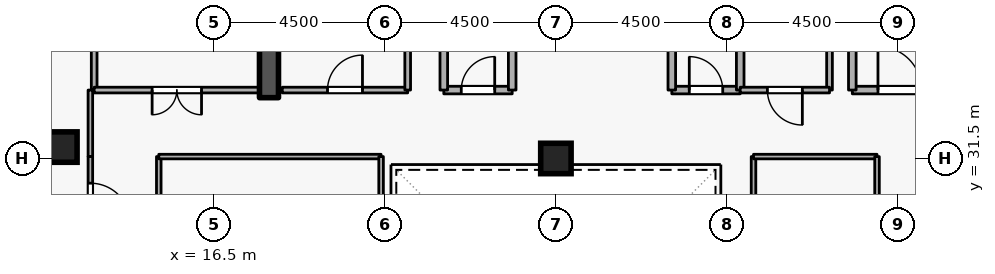
"""IFC4 building model, lengths in metres.
Left out: names, types, materials, properties, quantities, classifications, styles, units other than length and angle.
Written with IfcOpenShell. Run it as: python <this file> out.ifc"""

import sys

from ifc_helpers import new_model, si_unit, direction, frame, frame_2d, origin, origin_2d, place, context, subcontext, project, spatial, rectangle, extrude, element, fill, save


model = new_model("IFC4")
c1 = context("Model", 3, precision=1e-05, world=origin(), true_north=direction((0.0, 1.0)))
c2 = subcontext(c1, "Body", "Model", "MODEL_VIEW")
j1 = project(units=[si_unit("LENGTHUNIT", "METRE"), si_unit("PLANEANGLEUNIT", "RADIAN")], contexts=[c1])
p1 = place(None, origin())
s1 = spatial("IfcSite", under=j1, at=p1, CompositionType="ELEMENT")
p2 = place(p1, origin())
s2 = spatial("IfcBuilding", under=s1, at=p2, CompositionType="ELEMENT")
p3 = place(p2, frame((0.0, 0.0, 261.9)))
s3 = spatial("IfcBuildingStorey", under=s2, at=p3, CompositionType="ELEMENT", Elevation=261.9)
p4 = place(p3, frame((17.95, 33.1, 0.0), z_axis=(0.0, 0.0, 1.0), x_axis=(0.0, 1.0, 0.0)))
e1 = element("IfcWall", 1, at=p4, inside=s3, PredefinedType="SHEAR", context=c2, shape_type="SweptSolid", body=[
    extrude(rectangle(XDim=5.8, YDim=0.5, at=frame_2d((2.9, 0.0))), origin(), (0.0, 0.0, 1.0), 3.6),
])
for number, where, z_axis, x_axis in (
    (2, (12.5, 31.8, 0.0), (0.0, 0.0, 1.0), (1.0, 0.0, 0.0)),
    (3, (25.5, 31.5, 0.0), (0.0, 0.0, 1.0), (1.0, 0.0, 0.0)),
):
    element("IfcColumn", number, at=place(p3, frame(where, z_axis=z_axis, x_axis=x_axis)), inside=s3, PredefinedType="COLUMN", context=c2, shape_type="SweptSolid", body=[
        extrude(rectangle(XDim=0.8, YDim=0.8, at=origin_2d()), origin(), (0.0, 0.0, 1.0), 3.6),
    ])
p5 = place(p3, frame((33.3, 33.3, 0.0), z_axis=(0.0, 0.0, 1.0), x_axis=(1.0, 0.0, 0.0)))
e4 = element("IfcWall", 4, at=p5, inside=s3, PredefinedType="STANDARD", context=c2, shape_type="SweptSolid", body=[
    extrude(rectangle(XDim=2.5, YDim=0.2, at=frame_2d((1.25, 0.0))), origin(), (0.0, 0.0, 1.0), 3.34),
])
p6 = place(p5, frame((0.675, 0.0, 0.0)))
e5 = element("IfcOpeningElement", 5, at=p6, cuts=e4, PredefinedType="OPENING", context=c2, shape_type="SweptSolid", body=[
    extrude(rectangle(XDim=1.15, YDim=2.1, at=frame_2d((0.575, 1.05))), frame((0.0, 0.11, 0.0), z_axis=(0.0, -1.0, 0.0), x_axis=(1.0, 0.0, 0.0)), (0.0, 0.0, 1.0), 0.22),
])
p7 = place(p3, frame((33.3, 35.6, 0.0), z_axis=(0.0, 0.0, 1.0), x_axis=(0.0, -1.0, 0.0)))
e6 = element("IfcWall", 6, at=p7, inside=s3, PredefinedType="STANDARD", context=c2, shape_type="SweptSolid", body=[
    extrude(rectangle(XDim=2.3, YDim=0.2, at=frame_2d((1.15, 0.0))), origin(), (0.0, 0.0, 1.0), 2.545),
])
p8 = place(p3, frame((22.55, 33.3, 0.0), z_axis=(0.0, 0.0, 1.0), x_axis=(1.0, 0.0, 0.0)))
e7 = element("IfcWall", 7, at=p8, inside=s3, PredefinedType="STANDARD", context=c2, shape_type="SweptSolid", body=[
    extrude(rectangle(XDim=1.8, YDim=0.2, at=frame_2d((0.9, 0.0))), origin(), (0.0, 0.0, 1.0), 3.34),
])
p9 = place(p8, frame((0.46, 0.0, 0.0)))
e8 = element("IfcOpeningElement", 8, at=p9, cuts=e7, PredefinedType="OPENING", context=c2, shape_type="SweptSolid", body=[
    extrude(rectangle(XDim=0.88, YDim=2.04, at=frame_2d((0.44, 1.02))), frame((0.0, 0.11, 0.0), z_axis=(0.0, -1.0, 0.0), x_axis=(1.0, 0.0, 0.0)), (0.0, 0.0, 1.0), 0.22),
])
for number, where, z_axis, x_axis in (
    (9, (24.35, 33.3, 0.0), (0.0, 0.0, 1.0), (0.0, 1.0, 0.0)),
    (10, (22.55, 35.35, 0.0), (0.0, 0.0, 1.0), (0.0, -1.0, 0.0)),
):
    element("IfcWall", number, at=place(p3, frame(where, z_axis=z_axis, x_axis=x_axis)), inside=s3, PredefinedType="STANDARD", context=c2, shape_type="SweptSolid", body=[
        extrude(rectangle(XDim=2.05, YDim=0.2, at=frame_2d((1.025, 0.0))), origin(), (0.0, 0.0, 1.0), 3.34),
    ])
p10 = place(p3, frame((28.55, 33.3, 0.0), z_axis=(0.0, 0.0, 1.0), x_axis=(1.0, 0.0, 0.0)))
e11 = element("IfcWall", 11, at=p10, inside=s3, PredefinedType="STANDARD", context=c2, shape_type="SweptSolid", body=[
    extrude(rectangle(XDim=1.8, YDim=0.2, at=frame_2d((0.9, 0.0))), origin(), (0.0, 0.0, 1.0), 3.34),
])
p11 = place(p10, frame((0.46, 0.0, 0.0)))
e12 = element("IfcOpeningElement", 12, at=p11, cuts=e11, PredefinedType="OPENING", context=c2, shape_type="SweptSolid", body=[
    extrude(rectangle(XDim=0.88, YDim=2.04, at=frame_2d((0.44, 1.02))), frame((0.0, 0.11, 0.0), z_axis=(0.0, -1.0, 0.0), x_axis=(1.0, 0.0, 0.0)), (0.0, 0.0, 1.0), 0.22),
])
for number, where, z_axis, x_axis in (
    (13, (30.35, 33.3, 0.0), (0.0, 0.0, 1.0), (0.0, 1.0, 0.0)),
    (14, (28.55, 35.35, 0.0), (0.0, 0.0, 1.0), (0.0, -1.0, 0.0)),
):
    element("IfcWall", number, at=place(p3, frame(where, z_axis=z_axis, x_axis=x_axis)), inside=s3, PredefinedType="STANDARD", context=c2, shape_type="SweptSolid", body=[
        extrude(rectangle(XDim=2.05, YDim=0.2, at=frame_2d((1.025, 0.0))), origin(), (0.0, 0.0, 1.0), 3.34),
    ])
p12 = place(p3, frame((18.3, 33.3, 0.0), z_axis=(0.0, 0.0, 1.0), x_axis=(1.0, 0.0, 0.0)))
e15 = element("IfcWall", 15, at=p12, inside=s3, PredefinedType="PARTITIONING", context=c2, shape_type="SweptSolid", body=[
    extrude(rectangle(XDim=3.3, YDim=0.15, at=frame_2d((1.65, 0.0))), origin(), (0.0, 0.0, 1.0), 3.34),
])
p13 = place(p12, frame((1.19, 0.0, 0.0)))
e16 = element("IfcOpeningElement", 16, at=p13, cuts=e15, PredefinedType="OPENING", context=c2, shape_type="SweptSolid", body=[
    extrude(rectangle(XDim=0.92, YDim=2.08, at=frame_2d((0.46, 1.04))), frame((0.0, 0.085, 0.0), z_axis=(0.0, -1.0, 0.0), x_axis=(1.0, 0.0, 0.0)), (0.0, 0.0, 1.0), 0.17),
])
p14 = place(p3, frame((21.6, 33.3, 0.0), z_axis=(0.0, 0.0, 1.0), x_axis=(0.0, 1.0, 0.0)))
e17 = element("IfcWall", 17, at=p14, inside=s3, PredefinedType="PARTITIONING", context=c2, shape_type="SweptSolid", body=[
    extrude(rectangle(XDim=2.05, YDim=0.15, at=frame_2d((1.025, 0.0))), origin(), (0.0, 0.0, 1.0), 3.34),
])
p15 = place(p3, frame((32.7, 35.35, 0.0), z_axis=(0.0, 0.0, 1.0), x_axis=(0.0, -1.0, 0.0)))
e18 = element("IfcWall", 18, at=p15, inside=s3, PredefinedType="PARTITIONING", context=c2, shape_type="SweptSolid", body=[
    extrude(rectangle(XDim=2.05, YDim=0.15, at=frame_2d((1.025, 0.0))), origin(), (0.0, 0.0, 1.0), 2.545),
])
p16 = place(p3, frame((32.7, 33.3, 0.0), z_axis=(0.0, 0.0, 1.0), x_axis=(-1.0, 0.0, 0.0)))
e19 = element("IfcWall", 19, at=p16, inside=s3, PredefinedType="PARTITIONING", context=c2, shape_type="SweptSolid", body=[
    extrude(rectangle(XDim=2.35, YDim=0.15, at=frame_2d((1.175, 0.0))), origin(), (0.0, 0.0, 1.0), 3.34),
])
p17 = place(p16, frame((0.715, 0.0, 0.0)))
e20 = element("IfcOpeningElement", 20, at=p17, cuts=e19, PredefinedType="OPENING", context=c2, shape_type="SweptSolid", body=[
    extrude(rectangle(XDim=0.92, YDim=2.08, at=frame_2d((0.46, 1.04))), frame((0.0, 0.085, 0.0), z_axis=(0.0, -1.0, 0.0), x_axis=(1.0, 0.0, 0.0)), (0.0, 0.0, 1.0), 0.17),
])
p18 = place(p3, frame((13.35, 33.3, 0.0), z_axis=(0.0, 0.0, 1.0), x_axis=(0.0, 1.0, 0.0)))
e21 = element("IfcWall", 21, at=p18, inside=s3, PredefinedType="PARTITIONING", context=c2, shape_type="SweptSolid", body=[
    extrude(rectangle(XDim=11.42, YDim=0.15, at=frame_2d((5.71, 0.0))), origin(), (0.0, 0.0, 1.0), 3.34),
])
p19 = place(p3, frame((17.7, 33.3, 0.0), z_axis=(0.0, 0.0, 1.0), x_axis=(-1.0, 0.0, 0.0)))
e22 = element("IfcWall", 22, at=p19, inside=s3, PredefinedType="PARTITIONING", context=c2, shape_type="SweptSolid", body=[
    extrude(rectangle(XDim=4.35, YDim=0.15, at=frame_2d((2.175, 0.0))), origin(), (0.0, 0.0, 1.0), 3.34),
])
p20 = place(p19, frame((1.525, 0.0, 0.0)))
e23 = element("IfcOpeningElement", 23, at=p20, cuts=e22, PredefinedType="OPENING", context=c2, shape_type="SweptSolid", body=[
    extrude(rectangle(XDim=1.3, YDim=2.12, at=frame_2d((0.65, 1.06))), frame((0.0, 0.085, 0.0), z_axis=(0.0, -1.0, 0.0), x_axis=(1.0, 0.0, 0.0)), (0.0, 0.0, 1.0), 0.17),
])
p21 = place(p3, frame((13.25, 33.3, 0.0), z_axis=(0.0, 0.0, 1.0), x_axis=(0.0, -1.0, 0.0)))
e24 = element("IfcWall", 24, at=p21, inside=s3, PredefinedType="PARTITIONING", context=c2, shape_type="SweptSolid", body=[
    extrude(rectangle(XDim=1.75, YDim=0.12, at=frame_2d((0.875, 0.0))), origin(), (0.0, 0.0, 1.0), 3.34),
])
p22 = place(p3, frame((13.25, 31.55, 0.0), z_axis=(0.0, 0.0, 1.0), x_axis=(0.0, -1.0, 0.0)))
e25 = element("IfcWall", 25, at=p22, inside=s3, PredefinedType="PARTITIONING", context=c2, shape_type="SweptSolid", body=[
    extrude(rectangle(XDim=2.45, YDim=0.12, at=frame_2d((1.225, 0.0))), origin(), (0.0, 0.0, 1.0), 3.34),
])
p23 = place(p22, frame((0.7, 0.0, 0.0)))
e26 = element("IfcOpeningElement", 26, at=p23, cuts=e25, PredefinedType="OPENING", context=c2, shape_type="SweptSolid", body=[
    extrude(rectangle(XDim=1.05, YDim=2.1, at=frame_2d((0.525, 1.05))), frame((0.0, 0.07, 0.0), z_axis=(0.0, -1.0, 0.0), x_axis=(1.0, 0.0, 0.0)), (0.0, 0.0, 1.0), 0.14),
])
p24 = place(p3, frame((15.05, 22.45, 0.0), z_axis=(0.0, 0.0, 1.0), x_axis=(0.0, 1.0, 0.0)))
e27 = element("IfcWall", 27, at=p24, inside=s3, PredefinedType="PARTITIONING", context=c2, shape_type="SweptSolid", body=[
    extrude(rectangle(XDim=9.1, YDim=0.12, at=frame_2d((4.55, 0.0))), origin(), (0.0, 0.0, 1.0), 3.34),
])
p25 = place(p24, frame((4.075, 0.0, 0.0)))
e28 = element("IfcOpeningElement", 28, at=p25, cuts=e27, PredefinedType="OPENING", context=c2, shape_type="SweptSolid", body=[
    extrude(rectangle(XDim=0.95, YDim=2.1, at=frame_2d((0.475, 1.05))), frame((0.0, 0.07, 0.0), z_axis=(0.0, -1.0, 0.0), x_axis=(1.0, 0.0, 0.0)), (0.0, 0.0, 1.0), 0.14),
])
p26 = place(p3, frame((15.05, 31.55, 0.0), z_axis=(0.0, 0.0, 1.0), x_axis=(1.0, 0.0, 0.0)))
e29 = element("IfcWall", 29, at=p26, inside=s3, PredefinedType="PARTITIONING", context=c2, shape_type="SweptSolid", body=[
    extrude(rectangle(XDim=5.85, YDim=0.12, at=frame_2d((2.925, 0.0))), origin(), (0.0, 0.0, 1.0), 3.34),
])
for number, where, z_axis, x_axis in (
    (30, (20.9, 31.55, 0.0), (0.0, 0.0, 1.0), (0.0, -1.0, 0.0)),
    (31, (30.7, 22.45, 0.0), (0.0, 0.0, 1.0), (0.0, 1.0, 0.0)),
):
    element("IfcWall", number, at=place(p3, frame(where, z_axis=z_axis, x_axis=x_axis)), inside=s3, PredefinedType="PARTITIONING", context=c2, shape_type="SweptSolid", body=[
        extrude(rectangle(XDim=9.1, YDim=0.12, at=frame_2d((4.55, 0.0))), origin(), (0.0, 0.0, 1.0), 3.34),
    ])
p27 = place(p3, frame((30.7, 31.55, 0.0), z_axis=(0.0, 0.0, 1.0), x_axis=(1.0, 0.0, 0.0)))
e32 = element("IfcWall", 32, at=p27, inside=s3, PredefinedType="PARTITIONING", context=c2, shape_type="SweptSolid", body=[
    extrude(rectangle(XDim=3.25, YDim=0.12, at=frame_2d((1.625, 0.0))), origin(), (0.0, 0.0, 1.0), 3.34),
])
p28 = place(p3, frame((33.95, 31.55, 0.0), z_axis=(0.0, 0.0, 1.0), x_axis=(0.0, -1.0, 0.0)))
e33 = element("IfcWall", 33, at=p28, inside=s3, PredefinedType="PARTITIONING", context=c2, shape_type="SweptSolid", body=[
    extrude(rectangle(XDim=9.1, YDim=0.12, at=frame_2d((4.55, 0.0))), origin(), (0.0, 0.0, 1.0), 3.34),
])
p29 = place(p28, frame((4.075, 0.0, 0.0)))
e34 = element("IfcOpeningElement", 34, at=p29, cuts=e33, PredefinedType="OPENING", context=c2, shape_type="SweptSolid", body=[
    extrude(rectangle(XDim=0.95, YDim=2.1, at=frame_2d((0.475, 1.05))), frame((0.0, 0.07, 0.0), z_axis=(0.0, -1.0, 0.0), x_axis=(1.0, 0.0, 0.0)), (0.0, 0.0, 1.0), 0.14),
])
p30 = place(p6, origin())
e35 = element("IfcDoor", 35, at=p30, inside=s3, OperationType="SINGLE_SWING_LEFT", PredefinedType="DOOR", context=c2, shape_type="SweptSolid", body=[
    extrude(rectangle(XDim=1.15, YDim=2.1, at=frame_2d((0.575, 1.05))), frame((0.0, 0.025, 0.0), z_axis=(0.0, -1.0, 0.0), x_axis=(1.0, 0.0, 0.0)), (0.0, 0.0, 1.0), 0.05),
])
fill(e5, e35)
p31 = place(p9, origin())
e36 = element("IfcDoor", 36, at=p31, inside=s3, OperationType="SINGLE_SWING_RIGHT", PredefinedType="DOOR", context=c2, shape_type="SweptSolid", body=[
    extrude(rectangle(XDim=0.88, YDim=2.04, at=frame_2d((0.44, 1.02))), frame((0.0, 0.025, 0.0), z_axis=(0.0, -1.0, 0.0), x_axis=(1.0, 0.0, 0.0)), (0.0, 0.0, 1.0), 0.05),
])
fill(e8, e36)
p32 = place(p11, origin())
e37 = element("IfcDoor", 37, at=p32, inside=s3, OperationType="SINGLE_SWING_LEFT", PredefinedType="DOOR", context=c2, shape_type="SweptSolid", body=[
    extrude(rectangle(XDim=0.88, YDim=2.04, at=frame_2d((0.44, 1.02))), frame((0.0, 0.025, 0.0), z_axis=(0.0, -1.0, 0.0), x_axis=(1.0, 0.0, 0.0)), (0.0, 0.0, 1.0), 0.05),
])
fill(e12, e37)
p33 = place(p13, origin())
e38 = element("IfcDoor", 38, at=p33, inside=s3, OperationType="SINGLE_SWING_RIGHT", PredefinedType="DOOR", context=c2, shape_type="SweptSolid", body=[
    extrude(rectangle(XDim=0.92, YDim=2.08, at=frame_2d((0.46, 1.04))), frame((0.0, 0.025, 0.0), z_axis=(0.0, -1.0, 0.0), x_axis=(1.0, 0.0, 0.0)), (0.0, 0.0, 1.0), 0.05),
])
fill(e16, e38)
p34 = place(p17, origin())
e39 = element("IfcDoor", 39, at=p34, inside=s3, OperationType="SINGLE_SWING_LEFT", PredefinedType="DOOR", context=c2, shape_type="SweptSolid", body=[
    extrude(rectangle(XDim=0.92, YDim=2.08, at=frame_2d((0.46, 1.04))), frame((0.0, 0.025, 0.0), z_axis=(0.0, -1.0, 0.0), x_axis=(1.0, 0.0, 0.0)), (0.0, 0.0, 1.0), 0.05),
])
fill(e20, e39)
p35 = place(p20, origin())
e40 = element("IfcDoor", 40, at=p35, inside=s3, OperationType="DOUBLE_DOOR_SINGLE_SWING", PredefinedType="DOOR", context=c2, shape_type="SweptSolid", body=[
    extrude(rectangle(XDim=1.3, YDim=2.12, at=frame_2d((0.65, 1.06))), frame((0.0, 0.025, 0.0), z_axis=(0.0, -1.0, 0.0), x_axis=(1.0, 0.0, 0.0)), (0.0, 0.0, 1.0), 0.05),
])
fill(e23, e40)
p36 = place(p23, origin())
e41 = element("IfcDoor", 41, at=p36, inside=s3, OperationType="SINGLE_SWING_RIGHT", PredefinedType="DOOR", context=c2, shape_type="SweptSolid", body=[
    extrude(rectangle(XDim=1.05, YDim=2.1, at=frame_2d((0.525, 1.05))), frame((0.0, 0.025, 0.0), z_axis=(0.0, -1.0, 0.0), x_axis=(1.0, 0.0, 0.0)), (0.0, 0.0, 1.0), 0.05),
])
fill(e26, e41)
save(model, sys.argv[1])
